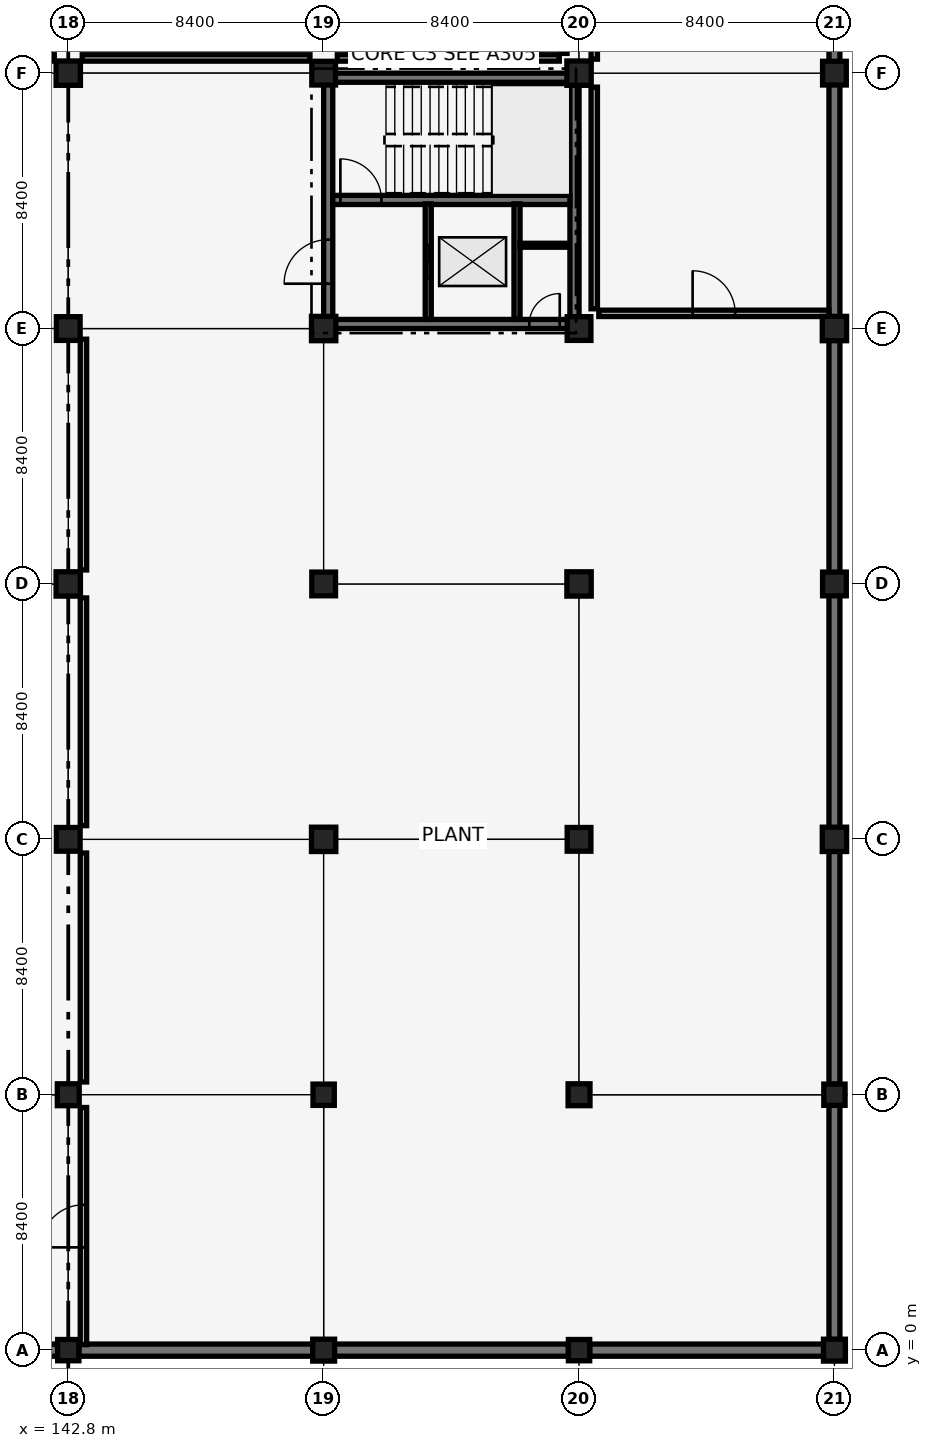
"""IFC4 building model, lengths in metres.
Left out: names, types, materials, properties, quantities, classifications, styles, units other than length and angle.
Written with IfcOpenShell. Run it as: python <this file> out.ifc"""

import sys

from ifc_helpers import new_model, si_unit, direction, frame, frame_2d, origin, origin_2d, place, context, subcontext, project, spatial, rectangle, extrude, element, fill, save


model = new_model("IFC4")
c1 = context("Model", 3, precision=1e-05, world=origin(), true_north=direction((0.0, 1.0)))
c2 = subcontext(c1, "Body", "Model", "MODEL_VIEW")
j1 = project(units=[si_unit("LENGTHUNIT", "METRE"), si_unit("PLANEANGLEUNIT", "RADIAN")], contexts=[c1])
p1 = place(None, origin())
s1 = spatial("IfcSite", under=j1, at=p1, CompositionType="ELEMENT")
p2 = place(p1, origin())
s2 = spatial("IfcBuilding", under=s1, at=p2, CompositionType="ELEMENT")
p3 = place(p2, frame((0.0, 0.0, -4.42)))
s3 = spatial("IfcBuildingStorey", under=s2, at=p3, CompositionType="ELEMENT", Elevation=-4.42)
p4 = place(p3, frame((134.75, 0.0, 0.0), z_axis=(0.0, 0.0, 1.0), x_axis=(1.0, 0.0, 0.0)))
e1 = element("IfcWall", 1, at=p4, inside=s3, PredefinedType="USERDEFINED", context=c2, shape_type="SweptSolid", body=[
    extrude(rectangle(XDim=7.7, YDim=0.4, at=frame_2d((3.85, 0.0))), origin(), (0.0, 0.0, 1.0), 4.12),
])
p5 = place(p3, frame((143.15, 0.0, 0.0), z_axis=(0.0, 0.0, 1.0), x_axis=(1.0, 0.0, 0.0)))
e2 = element("IfcWall", 2, at=p5, inside=s3, PredefinedType="USERDEFINED", context=c2, shape_type="SweptSolid", body=[
    extrude(rectangle(XDim=7.7, YDim=0.4, at=frame_2d((3.85, 0.0))), origin(), (0.0, 0.0, 1.0), 4.12),
])
for number, where, z_axis, x_axis in (
    (3, (151.55, 0.0, 0.0), (0.0, 0.0, 1.0), (1.0, 0.0, 0.0)),
    (4, (159.95, 0.0, 0.0), (0.0, 0.0, 1.0), (1.0, 0.0, 0.0)),
):
    element("IfcWall", number, at=place(p3, frame(where, z_axis=z_axis, x_axis=x_axis)), inside=s3, PredefinedType="USERDEFINED", context=c2, shape_type="SweptSolid", body=[
        extrude(rectangle(XDim=7.7, YDim=0.4, at=frame_2d((3.85, 0.0))), origin(), (0.0, 0.0, 1.0), 4.12),
    ])
for number, where, z_axis, x_axis in (
    (5, (168.0, 0.35, 0.0), (0.0, 0.0, 1.0), (0.0, 1.0, 0.0)),
    (6, (168.0, 8.75, 0.0), (0.0, 0.0, 1.0), (0.0, 1.0, 0.0)),
):
    element("IfcWall", number, at=place(p3, frame(where, z_axis=z_axis, x_axis=x_axis)), inside=s3, PredefinedType="USERDEFINED", context=c2, shape_type="SweptSolid", body=[
        extrude(rectangle(XDim=7.7, YDim=0.36, at=frame_2d((3.85, 0.0))), origin(), (0.0, 0.0, 1.0), 4.12),
    ])
p6 = place(p3, frame((168.0, 17.15, 0.0), z_axis=(0.0, 0.0, 1.0), x_axis=(0.0, 1.0, 0.0)))
e7 = element("IfcWall", 7, at=p6, inside=s3, PredefinedType="USERDEFINED", context=c2, shape_type="SweptSolid", body=[
    extrude(rectangle(XDim=7.7, YDim=0.36, at=frame_2d((3.85, 0.0))), origin(), (0.0, 0.0, 1.0), 4.12),
])
for number, where, z_axis, x_axis in (
    (8, (168.0, 25.55, 0.0), (0.0, 0.0, 1.0), (0.0, 1.0, 0.0)),
    (9, (168.0, 33.95, 0.0), (0.0, 0.0, 1.0), (0.0, 1.0, 0.0)),
    (10, (168.0, 42.35, 0.0), (0.0, 0.0, 1.0), (0.0, 1.0, 0.0)),
):
    element("IfcWall", number, at=place(p3, frame(where, z_axis=z_axis, x_axis=x_axis)), inside=s3, PredefinedType="USERDEFINED", context=c2, shape_type="SweptSolid", body=[
        extrude(rectangle(XDim=7.7, YDim=0.36, at=frame_2d((3.85, 0.0))), origin(), (0.0, 0.0, 1.0), 4.12),
    ])
p7 = place(p3, frame((151.35, 33.75, 0.0), z_axis=(0.0, 0.0, 1.0), x_axis=(1.0, 0.0, 0.0)))
e11 = element("IfcWall", 11, at=p7, inside=s3, PredefinedType="SHEAR", context=c2, shape_type="SweptSolid", body=[
    extrude(rectangle(XDim=8.1, YDim=0.3, at=frame_2d((4.05, 0.0))), origin(), (0.0, 0.0, 1.0), 4.12),
])
p8 = place(p7, frame((6.615, 0.0, 0.0)))
e12 = element("IfcOpeningElement", 12, at=p8, cuts=e11, PredefinedType="OPENING", context=c2, shape_type="SweptSolid", body=[
    extrude(rectangle(XDim=1.0, YDim=2.15, at=frame_2d((0.5, 1.075))), frame((0.0, 0.16, 0.0), z_axis=(0.0, -1.0, 0.0), x_axis=(1.0, 0.0, 0.0)), (0.0, 0.0, 1.0), 0.32),
])
p9 = place(p3, frame((151.35, 41.85, 0.0), z_axis=(0.0, 0.0, 1.0), x_axis=(1.0, 0.0, 0.0)))
e13 = element("IfcWall", 13, at=p9, inside=s3, PredefinedType="SHEAR", context=c2, shape_type="SweptSolid", body=[
    extrude(rectangle(XDim=8.1, YDim=0.3, at=frame_2d((4.05, 0.0))), origin(), (0.0, 0.0, 1.0), 4.12),
])
p10 = place(p3, frame((151.35, 33.75, 0.0), z_axis=(0.0, 0.0, 1.0), x_axis=(0.0, 1.0, 0.0)))
e14 = element("IfcWall", 14, at=p10, inside=s3, PredefinedType="SHEAR", context=c2, shape_type="SweptSolid", body=[
    extrude(rectangle(XDim=8.1, YDim=0.3, at=frame_2d((4.05, 0.0))), origin(), (0.0, 0.0, 1.0), 4.12),
])
p11 = place(p10, frame((1.325, 0.0, 0.0)))
e15 = element("IfcOpeningElement", 15, at=p11, cuts=e14, PredefinedType="OPENING", context=c2, shape_type="SweptSolid", body=[
    extrude(rectangle(XDim=1.45, YDim=2.15, at=frame_2d((0.725, 1.075))), frame((0.0, 0.16, 0.0), z_axis=(0.0, -1.0, 0.0), x_axis=(1.0, 0.0, 0.0)), (0.0, 0.0, 1.0), 0.32),
])
p12 = place(p3, frame((159.45, 33.75, 0.0), z_axis=(0.0, 0.0, 1.0), x_axis=(0.0, 1.0, 0.0)))
e16 = element("IfcWall", 16, at=p12, inside=s3, PredefinedType="SHEAR", context=c2, shape_type="SweptSolid", body=[
    extrude(rectangle(XDim=8.1, YDim=0.3, at=frame_2d((4.05, 0.0))), origin(), (0.0, 0.0, 1.0), 4.12),
])
p13 = place(p3, frame((151.5, 37.83, 0.0), z_axis=(0.0, 0.0, 1.0), x_axis=(1.0, 0.0, 0.0)))
e17 = element("IfcWall", 17, at=p13, inside=s3, PredefinedType="SHEAR", context=c2, shape_type="SweptSolid", body=[
    extrude(rectangle(XDim=7.8, YDim=0.3, at=frame_2d((3.9, 0.0))), origin(), (0.0, 0.0, 1.0), 4.12),
])
p14 = place(p13, frame((0.25, 0.0, 0.0)))
e18 = element("IfcOpeningElement", 18, at=p14, cuts=e17, PredefinedType="OPENING", context=c2, shape_type="SweptSolid", body=[
    extrude(rectangle(XDim=1.35, YDim=2.15, at=frame_2d((0.675, 1.075))), frame((0.0, 0.16, 0.0), z_axis=(0.0, -1.0, 0.0), x_axis=(1.0, 0.0, 0.0)), (0.0, 0.0, 1.0), 0.32),
])
p15 = place(p3, frame((142.8, 0.0, -0.4), z_axis=(0.0, 0.0, 1.0), x_axis=(1.0, 0.0, 0.0)))
e19 = element("IfcColumn", 19, at=p15, inside=s3, PredefinedType="COLUMN", context=c2, shape_type="SweptSolid", body=[
    extrude(rectangle(XDim=0.7, YDim=0.7, at=origin_2d()), origin(), (0.0, 0.0, 1.0), 4.52),
])
p16 = place(p3, frame((142.8, 8.4, -0.4), z_axis=(0.0, 0.0, 1.0), x_axis=(1.0, 0.0, 0.0)))
e20 = element("IfcColumn", 20, at=p16, inside=s3, PredefinedType="COLUMN", context=c2, shape_type="SweptSolid", body=[
    extrude(rectangle(XDim=0.72, YDim=0.72, at=origin_2d()), origin(), (0.0, 0.0, 1.0), 4.52),
])
p17 = place(p3, frame((142.8, 16.8, -0.4), z_axis=(0.0, 0.0, 1.0), x_axis=(1.0, 0.0, 0.0)))
e21 = element("IfcColumn", 21, at=p17, inside=s3, PredefinedType="COLUMN", context=c2, shape_type="SweptSolid", body=[
    extrude(rectangle(XDim=0.78, YDim=0.78, at=origin_2d()), origin(), (0.0, 0.0, 1.0), 4.52),
])
p18 = place(p3, frame((142.8, 25.2, -0.4), z_axis=(0.0, 0.0, 1.0), x_axis=(1.0, 0.0, 0.0)))
e22 = element("IfcColumn", 22, at=p18, inside=s3, PredefinedType="COLUMN", context=c2, shape_type="SweptSolid", body=[
    extrude(rectangle(XDim=0.8, YDim=0.8, at=origin_2d()), origin(), (0.0, 0.0, 1.0), 4.52),
])
p19 = place(p3, frame((142.8, 33.6, -0.4), z_axis=(0.0, 0.0, 1.0), x_axis=(1.0, 0.0, 0.0)))
e23 = element("IfcColumn", 23, at=p19, inside=s3, PredefinedType="COLUMN", context=c2, shape_type="SweptSolid", body=[
    extrude(rectangle(XDim=0.78, YDim=0.78, at=origin_2d()), origin(), (0.0, 0.0, 1.0), 4.52),
])
p20 = place(p3, frame((142.8, 42.0, -0.4), z_axis=(0.0, 0.0, 1.0), x_axis=(1.0, 0.0, 0.0)))
e24 = element("IfcColumn", 24, at=p20, inside=s3, PredefinedType="COLUMN", context=c2, shape_type="SweptSolid", body=[
    extrude(rectangle(XDim=0.8, YDim=0.8, at=origin_2d()), origin(), (0.0, 0.0, 1.0), 4.52),
])
p21 = place(p3, frame((151.2, 0.0, -0.4), z_axis=(0.0, 0.0, 1.0), x_axis=(1.0, 0.0, 0.0)))
e25 = element("IfcColumn", 25, at=p21, inside=s3, PredefinedType="COLUMN", context=c2, shape_type="SweptSolid", body=[
    extrude(rectangle(XDim=0.72, YDim=0.72, at=origin_2d()), origin(), (0.0, 0.0, 1.0), 4.52),
])
p22 = place(p3, frame((151.2, 8.4, -0.4), z_axis=(0.0, 0.0, 1.0), x_axis=(1.0, 0.0, 0.0)))
e26 = element("IfcColumn", 26, at=p22, inside=s3, PredefinedType="COLUMN", context=c2, shape_type="SweptSolid", body=[
    extrude(rectangle(XDim=0.7, YDim=0.7, at=origin_2d()), origin(), (0.0, 0.0, 1.0), 4.52),
])
p23 = place(p3, frame((151.2, 16.8, -0.4), z_axis=(0.0, 0.0, 1.0), x_axis=(1.0, 0.0, 0.0)))
e27 = element("IfcColumn", 27, at=p23, inside=s3, PredefinedType="COLUMN", context=c2, shape_type="SweptSolid", body=[
    extrude(rectangle(XDim=0.8, YDim=0.8, at=origin_2d()), origin(), (0.0, 0.0, 1.0), 4.52),
])
p24 = place(p3, frame((151.2, 25.2, -0.4), z_axis=(0.0, 0.0, 1.0), x_axis=(1.0, 0.0, 0.0)))
e28 = element("IfcColumn", 28, at=p24, inside=s3, PredefinedType="COLUMN", context=c2, shape_type="SweptSolid", body=[
    extrude(rectangle(XDim=0.78, YDim=0.78, at=origin_2d()), origin(), (0.0, 0.0, 1.0), 4.52),
])
p25 = place(p3, frame((151.2, 33.6, -0.4), z_axis=(0.0, 0.0, 1.0), x_axis=(1.0, 0.0, 0.0)))
e29 = element("IfcColumn", 29, at=p25, inside=s3, PredefinedType="COLUMN", context=c2, shape_type="SweptSolid", body=[
    extrude(rectangle(XDim=0.8, YDim=0.8, at=origin_2d()), origin(), (0.0, 0.0, 1.0), 4.52),
])
p26 = place(p3, frame((151.2, 42.0, -0.4), z_axis=(0.0, 0.0, 1.0), x_axis=(1.0, 0.0, 0.0)))
e30 = element("IfcColumn", 30, at=p26, inside=s3, PredefinedType="COLUMN", context=c2, shape_type="SweptSolid", body=[
    extrude(rectangle(XDim=0.78, YDim=0.78, at=origin_2d()), origin(), (0.0, 0.0, 1.0), 4.52),
])
p27 = place(p3, frame((159.6, 0.0, -0.4), z_axis=(0.0, 0.0, 1.0), x_axis=(1.0, 0.0, 0.0)))
e31 = element("IfcColumn", 31, at=p27, inside=s3, PredefinedType="COLUMN", context=c2, shape_type="SweptSolid", body=[
    extrude(rectangle(XDim=0.7, YDim=0.7, at=origin_2d()), origin(), (0.0, 0.0, 1.0), 4.52),
])
p28 = place(p3, frame((159.6, 8.4, -0.4), z_axis=(0.0, 0.0, 1.0), x_axis=(1.0, 0.0, 0.0)))
e32 = element("IfcColumn", 32, at=p28, inside=s3, PredefinedType="COLUMN", context=c2, shape_type="SweptSolid", body=[
    extrude(rectangle(XDim=0.72, YDim=0.72, at=origin_2d()), origin(), (0.0, 0.0, 1.0), 4.52),
])
p29 = place(p3, frame((159.6, 16.8, -0.4), z_axis=(0.0, 0.0, 1.0), x_axis=(1.0, 0.0, 0.0)))
e33 = element("IfcColumn", 33, at=p29, inside=s3, PredefinedType="COLUMN", context=c2, shape_type="SweptSolid", body=[
    extrude(rectangle(XDim=0.78, YDim=0.78, at=origin_2d()), origin(), (0.0, 0.0, 1.0), 4.52),
])
p30 = place(p3, frame((159.6, 25.2, -0.4), z_axis=(0.0, 0.0, 1.0), x_axis=(1.0, 0.0, 0.0)))
e34 = element("IfcColumn", 34, at=p30, inside=s3, PredefinedType="COLUMN", context=c2, shape_type="SweptSolid", body=[
    extrude(rectangle(XDim=0.8, YDim=0.8, at=origin_2d()), origin(), (0.0, 0.0, 1.0), 4.52),
])
p31 = place(p3, frame((159.6, 33.6, -0.4), z_axis=(0.0, 0.0, 1.0), x_axis=(1.0, 0.0, 0.0)))
e35 = element("IfcColumn", 35, at=p31, inside=s3, PredefinedType="COLUMN", context=c2, shape_type="SweptSolid", body=[
    extrude(rectangle(XDim=0.78, YDim=0.78, at=origin_2d()), origin(), (0.0, 0.0, 1.0), 4.52),
])
p32 = place(p3, frame((159.6, 42.0, -0.4), z_axis=(0.0, 0.0, 1.0), x_axis=(1.0, 0.0, 0.0)))
e36 = element("IfcColumn", 36, at=p32, inside=s3, PredefinedType="COLUMN", context=c2, shape_type="SweptSolid", body=[
    extrude(rectangle(XDim=0.8, YDim=0.8, at=origin_2d()), origin(), (0.0, 0.0, 1.0), 4.52),
])
p33 = place(p3, frame((168.0, 0.0, -0.4), z_axis=(0.0, 0.0, 1.0), x_axis=(1.0, 0.0, 0.0)))
e37 = element("IfcColumn", 37, at=p33, inside=s3, PredefinedType="COLUMN", context=c2, shape_type="SweptSolid", body=[
    extrude(rectangle(XDim=0.72, YDim=0.72, at=origin_2d()), origin(), (0.0, 0.0, 1.0), 4.52),
])
p34 = place(p3, frame((168.0, 8.4, -0.4), z_axis=(0.0, 0.0, 1.0), x_axis=(1.0, 0.0, 0.0)))
e38 = element("IfcColumn", 38, at=p34, inside=s3, PredefinedType="COLUMN", context=c2, shape_type="SweptSolid", body=[
    extrude(rectangle(XDim=0.7, YDim=0.7, at=origin_2d()), origin(), (0.0, 0.0, 1.0), 4.52),
])
p35 = place(p3, frame((168.0, 16.8, -0.4), z_axis=(0.0, 0.0, 1.0), x_axis=(1.0, 0.0, 0.0)))
e39 = element("IfcColumn", 39, at=p35, inside=s3, PredefinedType="COLUMN", context=c2, shape_type="SweptSolid", body=[
    extrude(rectangle(XDim=0.8, YDim=0.8, at=origin_2d()), origin(), (0.0, 0.0, 1.0), 4.52),
])
p36 = place(p3, frame((168.0, 25.2, -0.4), z_axis=(0.0, 0.0, 1.0), x_axis=(1.0, 0.0, 0.0)))
e40 = element("IfcColumn", 40, at=p36, inside=s3, PredefinedType="COLUMN", context=c2, shape_type="SweptSolid", body=[
    extrude(rectangle(XDim=0.78, YDim=0.78, at=origin_2d()), origin(), (0.0, 0.0, 1.0), 4.52),
])
p37 = place(p3, frame((168.0, 33.6, -0.4), z_axis=(0.0, 0.0, 1.0), x_axis=(1.0, 0.0, 0.0)))
e41 = element("IfcColumn", 41, at=p37, inside=s3, PredefinedType="COLUMN", context=c2, shape_type="SweptSolid", body=[
    extrude(rectangle(XDim=0.8, YDim=0.8, at=origin_2d()), origin(), (0.0, 0.0, 1.0), 4.52),
])
p38 = place(p3, frame((168.0, 42.0, -0.4), z_axis=(0.0, 0.0, 1.0), x_axis=(1.0, 0.0, 0.0)))
e42 = element("IfcColumn", 42, at=p38, inside=s3, PredefinedType="COLUMN", context=c2, shape_type="SweptSolid", body=[
    extrude(rectangle(XDim=0.78, YDim=0.78, at=origin_2d()), origin(), (0.0, 0.0, 1.0), 4.52),
])
p39 = place(p3, frame((154.64, 33.9, 0.0), z_axis=(0.0, 0.0, 1.0), x_axis=(0.0, 1.0, 0.0)))
e43 = element("IfcWall", 43, at=p39, inside=s3, PredefinedType="SHEAR", context=c2, shape_type="SweptSolid", body=[
    extrude(rectangle(XDim=3.8, YDim=0.2, at=frame_2d((1.9, 0.0))), origin(), (0.0, 0.0, 1.0), 3.17),
])
p40 = place(p39, frame((1.35, 0.0, 0.0)))
e44 = element("IfcOpeningElement", 44, at=p40, cuts=e43, PredefinedType="OPENING", context=c2, shape_type="SweptSolid", body=[
    extrude(rectangle(XDim=1.1, YDim=2.15, at=frame_2d((0.55, 1.075))), frame((0.0, 0.11, 0.0), z_axis=(0.0, -1.0, 0.0), x_axis=(1.0, 0.0, 0.0)), (0.0, 0.0, 1.0), 0.22),
])
p41 = place(p3, frame((157.56, 33.9, 0.0), z_axis=(0.0, 0.0, 1.0), x_axis=(0.0, 1.0, 0.0)))
e45 = element("IfcWall", 45, at=p41, inside=s3, PredefinedType="SHEAR", context=c2, shape_type="SweptSolid", body=[
    extrude(rectangle(XDim=3.8, YDim=0.2, at=frame_2d((1.9, 0.0))), origin(), (0.0, 0.0, 1.0), 3.17),
])
p42 = place(p3, frame((157.66, 36.34, 0.0), z_axis=(0.0, 0.0, 1.0), x_axis=(1.0, 0.0, 0.0)))
e46 = element("IfcWall", 46, at=p42, inside=s3, PredefinedType="PARTITIONING", context=c2, shape_type="SweptSolid", body=[
    extrude(rectangle(XDim=1.62, YDim=0.13, at=frame_2d((0.81, 0.0))), origin(), (0.0, 0.0, 1.0), 4.12),
])
p43 = place(p3, frame((143.3, 0.18, 0.0), z_axis=(0.0, 0.0, 1.0), x_axis=(0.0, 1.0, 0.0)))
e47 = element("IfcWall", 47, at=p43, inside=s3, PredefinedType="PARTITIONING", context=c2, shape_type="SweptSolid", body=[
    extrude(rectangle(XDim=7.8, YDim=0.21, at=frame_2d((3.9, 0.0))), origin(), (0.0, 0.0, 1.0), 3.38),
])
p44 = place(p43, frame((3.2, 0.0, 0.0)))
e48 = element("IfcOpeningElement", 48, at=p44, cuts=e47, PredefinedType="OPENING", context=c2, shape_type="SweptSolid", body=[
    extrude(rectangle(XDim=1.4, YDim=2.2, at=frame_2d((0.7, 1.1))), frame((0.0, 0.115, 0.0), z_axis=(0.0, -1.0, 0.0), x_axis=(1.0, 0.0, 0.0)), (0.0, 0.0, 1.0), 0.23),
])
p45 = place(p3, frame((143.3, 8.82, 0.0), z_axis=(0.0, 0.0, 1.0), x_axis=(0.0, 1.0, 0.0)))
e49 = element("IfcWall", 49, at=p45, inside=s3, PredefinedType="PARTITIONING", context=c2, shape_type="SweptSolid", body=[
    extrude(rectangle(XDim=7.53, YDim=0.21, at=frame_2d((3.765, 0.0))), origin(), (0.0, 0.0, 1.0), 3.57),
])
p46 = place(p3, frame((143.3, 17.25, 0.0), z_axis=(0.0, 0.0, 1.0), x_axis=(0.0, 1.0, 0.0)))
e50 = element("IfcWall", 50, at=p46, inside=s3, PredefinedType="PARTITIONING", context=c2, shape_type="SweptSolid", body=[
    extrude(rectangle(XDim=7.49, YDim=0.21, at=frame_2d((3.745, 0.0))), origin(), (0.0, 0.0, 1.0), 3.56),
])
p47 = place(p3, frame((143.3, 25.66, 0.0), z_axis=(0.0, 0.0, 1.0), x_axis=(0.0, 1.0, 0.0)))
e51 = element("IfcWall", 51, at=p47, inside=s3, PredefinedType="PARTITIONING", context=c2, shape_type="SweptSolid", body=[
    extrude(rectangle(XDim=7.59, YDim=0.21, at=frame_2d((3.795, 0.0))), origin(), (0.0, 0.0, 1.0), 3.17),
])
p48 = place(p3, frame((160.25, 34.1, 0.0), z_axis=(0.0, 0.0, 1.0), x_axis=(1.0, 0.0, 0.0)))
e52 = element("IfcWall", 52, at=p48, inside=s3, PredefinedType="PARTITIONING", context=c2, shape_type="SweptSolid", body=[
    extrude(rectangle(XDim=7.57, YDim=0.21, at=frame_2d((3.785, 0.0))), origin(), (0.0, 0.0, 1.0), 3.37),
])
p49 = place(p48, frame((3.085, 0.0, 0.0)))
e53 = element("IfcOpeningElement", 53, at=p49, cuts=e52, PredefinedType="OPENING", context=c2, shape_type="SweptSolid", body=[
    extrude(rectangle(XDim=1.4, YDim=2.2, at=frame_2d((0.7, 1.1))), frame((0.0, 0.115, 0.0), z_axis=(0.0, -1.0, 0.0), x_axis=(1.0, 0.0, 0.0)), (0.0, 0.0, 1.0), 0.23),
])
p50 = place(p3, frame((160.1, 34.25, 0.0), z_axis=(0.0, 0.0, 1.0), x_axis=(0.0, 1.0, 0.0)))
e54 = element("IfcWall", 54, at=p50, inside=s3, PredefinedType="PARTITIONING", context=c2, shape_type="SweptSolid", body=[
    extrude(rectangle(XDim=7.29, YDim=0.21, at=frame_2d((3.645, 0.0))), origin(), (0.0, 0.0, 1.0), 3.56),
])
p51 = place(p3, frame((160.1, 42.46, 0.0), z_axis=(0.0, 0.0, 1.0), x_axis=(0.0, 1.0, 0.0)))
e55 = element("IfcWall", 55, at=p51, inside=s3, PredefinedType="PARTITIONING", context=c2, shape_type="SweptSolid", body=[
    extrude(rectangle(XDim=7.49, YDim=0.21, at=frame_2d((3.745, 0.0))), origin(), (0.0, 0.0, 1.0), 3.57),
])
p52 = place(p3, frame((137.9, 42.5, 0.0), z_axis=(0.0, 0.0, 1.0), x_axis=(1.0, 0.0, 0.0)))
e56 = element("IfcWall", 56, at=p52, inside=s3, PredefinedType="PARTITIONING", context=c2, shape_type="SweptSolid", body=[
    extrude(rectangle(XDim=4.44, YDim=0.21, at=frame_2d((2.22, 0.0))), origin(), (0.0, 0.0, 1.0), 4.12),
])
p53 = place(p3, frame((143.26, 42.5, 0.0), z_axis=(0.0, 0.0, 1.0), x_axis=(1.0, 0.0, 0.0)))
e57 = element("IfcWall", 57, at=p53, inside=s3, PredefinedType="PARTITIONING", context=c2, shape_type="SweptSolid", body=[
    extrude(rectangle(XDim=7.49, YDim=0.21, at=frame_2d((3.745, 0.0))), origin(), (0.0, 0.0, 1.0), 4.12),
])
p54 = place(p3, frame((151.65, 42.5, 0.0), z_axis=(0.0, 0.0, 1.0), x_axis=(1.0, 0.0, 0.0)))
e58 = element("IfcWall", 58, at=p54, inside=s3, PredefinedType="PARTITIONING", context=c2, shape_type="SweptSolid", body=[
    extrude(rectangle(XDim=7.3, YDim=0.21, at=frame_2d((3.65, 0.0))), origin(), (0.0, 0.0, 1.0), 4.12),
])
p55 = place(p3, frame((159.1, 42.65, 0.0), z_axis=(0.0, 0.0, 1.0), x_axis=(0.0, 1.0, 0.0)))
e59 = element("IfcWall", 59, at=p55, inside=s3, PredefinedType="PARTITIONING", context=c2, shape_type="SweptSolid", body=[
    extrude(rectangle(XDim=7.3, YDim=0.21, at=frame_2d((3.65, 0.0))), origin(), (0.0, 0.0, 1.0), 3.56),
])
p56 = place(p14, origin())
e60 = element("IfcDoor", 60, at=p56, inside=s3, OperationType="SINGLE_SWING_LEFT", PredefinedType="DOOR", context=c2, shape_type="SweptSolid", body=[
    extrude(rectangle(XDim=1.35, YDim=2.15, at=frame_2d((0.675, 1.075))), frame((0.0, 0.025, 0.0), z_axis=(0.0, -1.0, 0.0), x_axis=(1.0, 0.0, 0.0)), (0.0, 0.0, 1.0), 0.05),
])
fill(e18, e60)
p57 = place(p40, origin())
e61 = element("IfcDoor", 61, at=p57, inside=s3, OperationType="SLIDING_TO_LEFT", PredefinedType="DOOR", context=c2, shape_type="SweptSolid", body=[
    extrude(rectangle(XDim=1.1, YDim=2.15, at=frame_2d((0.55, 1.075))), frame((0.0, 0.025, 0.0), z_axis=(0.0, -1.0, 0.0), x_axis=(1.0, 0.0, 0.0)), (0.0, 0.0, 1.0), 0.05),
])
fill(e44, e61)
p58 = place(p11, origin())
e62 = element("IfcDoor", 62, at=p58, inside=s3, OperationType="DOUBLE_DOOR_SINGLE_SWING", PredefinedType="DOOR", context=c2, shape_type="SweptSolid", body=[
    extrude(rectangle(XDim=1.45, YDim=2.15, at=frame_2d((0.725, 1.075))), frame((0.0, 0.025, 0.0), z_axis=(0.0, -1.0, 0.0), x_axis=(1.0, 0.0, 0.0)), (0.0, 0.0, 1.0), 0.05),
])
fill(e15, e62)
p59 = place(p8, origin())
e63 = element("IfcDoor", 63, at=p59, inside=s3, OperationType="SINGLE_SWING_RIGHT", PredefinedType="DOOR", context=c2, shape_type="SweptSolid", body=[
    extrude(rectangle(XDim=1.0, YDim=2.15, at=frame_2d((0.5, 1.075))), frame((0.0, 0.025, 0.0), z_axis=(0.0, -1.0, 0.0), x_axis=(1.0, 0.0, 0.0)), (0.0, 0.0, 1.0), 0.05),
])
fill(e12, e63)
p60 = place(p44, origin())
e64 = element("IfcDoor", 64, at=p60, inside=s3, OperationType="DOUBLE_DOOR_SINGLE_SWING", PredefinedType="DOOR", context=c2, shape_type="SweptSolid", body=[
    extrude(rectangle(XDim=1.4, YDim=2.2, at=frame_2d((0.7, 1.1))), frame((0.0, 0.025, 0.0), z_axis=(0.0, -1.0, 0.0), x_axis=(1.0, 0.0, 0.0)), (0.0, 0.0, 1.0), 0.05),
])
fill(e48, e64)
p61 = place(p49, origin())
e65 = element("IfcDoor", 65, at=p61, inside=s3, OperationType="DOUBLE_DOOR_SINGLE_SWING", PredefinedType="DOOR", context=c2, shape_type="SweptSolid", body=[
    extrude(rectangle(XDim=1.4, YDim=2.2, at=frame_2d((0.7, 1.1))), frame((0.0, 0.025, 0.0), z_axis=(0.0, -1.0, 0.0), x_axis=(1.0, 0.0, 0.0)), (0.0, 0.0, 1.0), 0.05),
])
fill(e53, e65)
save(model, sys.argv[1])
